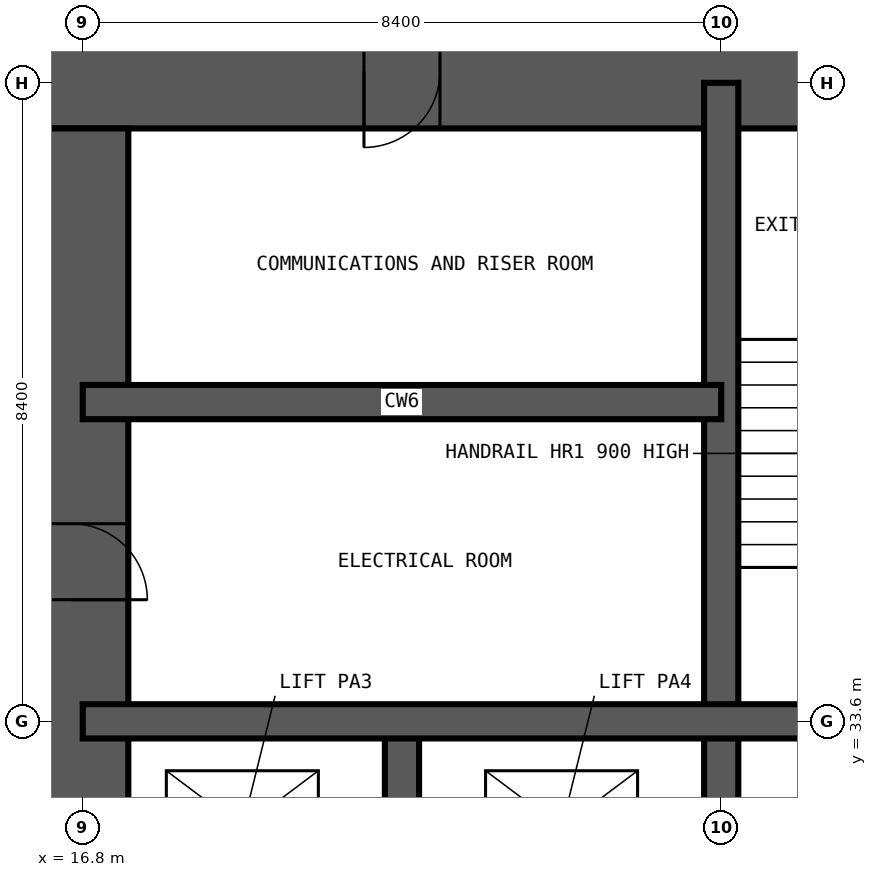
"""IFC4 building model, lengths in metres.
Left out: names, types, materials, properties, quantities, classifications, styles, units other than length and angle.
Written with IfcOpenShell. Run it as: python <this file> out.ifc"""

import sys

from ifc_helpers import new_model, si_unit, direction, frame, frame_2d, origin, place, context, subcontext, project, spatial, rectangle, extrude, element, fill, save


model = new_model("IFC4")
c1 = context("Model", 3, precision=1e-05, world=origin(), true_north=direction((0.0, 1.0)))
c2 = subcontext(c1, "Body", "Model", "MODEL_VIEW")
j1 = project(units=[si_unit("LENGTHUNIT", "METRE"), si_unit("PLANEANGLEUNIT", "RADIAN")], contexts=[c1])
p1 = place(None, origin())
s1 = spatial("IfcSite", under=j1, at=p1, CompositionType="ELEMENT")
p2 = place(p1, origin())
s2 = spatial("IfcBuilding", under=s1, at=p2, CompositionType="ELEMENT")
p3 = place(p2, frame((0.0, 0.0, 81.0)))
s3 = spatial("IfcBuildingStorey", under=s2, at=p3, CompositionType="ELEMENT", Elevation=81.0)
p4 = place(p3, frame((42.9, 42.15, -0.35), z_axis=(0.0, 0.0, 1.0), x_axis=(-1.0, 0.0, 0.0)))
e1 = element("IfcWall", 1, at=p4, inside=s3, PredefinedType="SHEAR", context=c2, shape_type="SweptSolid", body=[
    extrude(rectangle(XDim=27.0, YDim=1.5, at=frame_2d((13.5, 0.0))), origin(), (0.0, 0.0, 1.0), 3.6),
])
p5 = place(p4, frame((21.4, 0.0, 0.35)))
e2 = element("IfcOpeningElement", 2, at=p5, cuts=e1, PredefinedType="OPENING", context=c2, shape_type="SweptSolid", body=[
    extrude(rectangle(XDim=1.0, YDim=2.1, at=frame_2d((0.5, 1.05))), frame((0.0, 0.76, 0.0), z_axis=(0.0, -1.0, 0.0), x_axis=(1.0, 0.0, 0.0)), (0.0, 0.0, 1.0), 1.52),
])
p6 = place(p4, frame((10.8, 0.0, 0.35)))
e3 = element("IfcOpeningElement", 3, at=p6, cuts=e1, PredefinedType="OPENING", context=c2, shape_type="SweptSolid", body=[
    extrude(rectangle(XDim=1.2, YDim=2.2, at=frame_2d((0.6, 1.1))), frame((0.0, 0.76, 0.0), z_axis=(0.0, -1.0, 0.0), x_axis=(1.0, 0.0, 0.0)), (0.0, 0.0, 1.0), 1.52),
])
p7 = place(p3, frame((16.65, 41.4, -0.35), z_axis=(0.0, 0.0, 1.0), x_axis=(0.0, -1.0, 0.0)))
e4 = element("IfcWall", 4, at=p7, inside=s3, PredefinedType="SHEAR", context=c2, shape_type="SweptSolid", body=[
    extrude(rectangle(XDim=24.0, YDim=1.5, at=frame_2d((12.0, 0.0))), origin(), (0.0, 0.0, 1.0), 3.6),
])
p8 = place(p7, frame((11.1, 0.0, 0.35)))
e5 = element("IfcOpeningElement", 5, at=p8, cuts=e4, PredefinedType="OPENING", context=c2, shape_type="SweptSolid", body=[
    extrude(rectangle(XDim=1.8, YDim=2.2, at=frame_2d((0.9, 1.1))), frame((0.0, 0.76, 0.0), z_axis=(0.0, -1.0, 0.0), x_axis=(1.0, 0.0, 0.0)), (0.0, 0.0, 1.0), 1.52),
])
p9 = place(p7, frame((19.9, 0.0, 0.35)))
e6 = element("IfcOpeningElement", 6, at=p9, cuts=e4, PredefinedType="OPENING", context=c2, shape_type="SweptSolid", body=[
    extrude(rectangle(XDim=1.0, YDim=2.1, at=frame_2d((0.5, 1.05))), frame((0.0, 0.76, 0.0), z_axis=(0.0, -1.0, 0.0), x_axis=(1.0, 0.0, 0.0)), (0.0, 0.0, 1.0), 1.52),
])
p10 = place(p7, frame((5.2, 0.0, 0.35)))
e7 = element("IfcOpeningElement", 7, at=p10, cuts=e4, PredefinedType="OPENING", context=c2, shape_type="SweptSolid", body=[
    extrude(rectangle(XDim=1.0, YDim=2.1, at=frame_2d((0.5, 1.05))), frame((0.0, 0.76, 0.0), z_axis=(0.0, -1.0, 0.0), x_axis=(1.0, 0.0, 0.0)), (0.0, 0.0, 1.0), 1.52),
])
p11 = place(p3, frame((21.0, 30.8, -0.35), z_axis=(0.0, 0.0, 1.0), x_axis=(0.0, 1.0, 0.0)))
e8 = element("IfcWall", 8, at=p11, inside=s3, PredefinedType="SHEAR", context=c2, shape_type="SweptSolid", body=[
    extrude(rectangle(XDim=2.8, YDim=0.45, at=frame_2d((1.4, 0.0))), origin(), (0.0, 0.0, 1.0), 3.6),
])
for number, where, z_axis, x_axis in (
    (9, (25.2, 16.8, -0.35), (0.0, 0.0, 1.0), (0.0, 1.0, 0.0)),
    (10, (16.8, 33.6, -0.35), (0.0, 0.0, 1.0), (1.0, 0.0, 0.0)),
):
    element("IfcWall", number, at=place(p3, frame(where, z_axis=z_axis, x_axis=x_axis)), inside=s3, PredefinedType="SHEAR", context=c2, shape_type="SweptSolid", body=[
        extrude(rectangle(XDim=25.2, YDim=0.45, at=frame_2d((12.6, 0.0))), origin(), (0.0, 0.0, 1.0), 3.6),
    ])
p12 = place(p3, frame((16.8, 37.8, -0.35), z_axis=(0.0, 0.0, 1.0), x_axis=(1.0, 0.0, 0.0)))
e11 = element("IfcWall", 11, at=p12, inside=s3, PredefinedType="SHEAR", context=c2, shape_type="SweptSolid", body=[
    extrude(rectangle(XDim=8.4, YDim=0.45, at=frame_2d((4.2, 0.0))), origin(), (0.0, 0.0, 1.0), 3.6),
])
p13 = place(p10, origin())
e12 = element("IfcDoor", 12, at=p13, inside=s3, OperationType="SINGLE_SWING_RIGHT", PredefinedType="DOOR", context=c2, shape_type="SweptSolid", body=[
    extrude(rectangle(XDim=1.0, YDim=2.1, at=frame_2d((0.5, 1.05))), frame((0.0, 0.025, 0.0), z_axis=(0.0, -1.0, 0.0), x_axis=(1.0, 0.0, 0.0)), (0.0, 0.0, 1.0), 0.05),
])
fill(e7, e12)
p14 = place(p5, origin())
e13 = element("IfcDoor", 13, at=p14, inside=s3, OperationType="SINGLE_SWING_RIGHT", PredefinedType="DOOR", context=c2, shape_type="SweptSolid", body=[
    extrude(rectangle(XDim=1.0, YDim=2.1, at=frame_2d((0.5, 1.05))), frame((0.0, 0.025, 0.0), z_axis=(0.0, -1.0, 0.0), x_axis=(1.0, 0.0, 0.0)), (0.0, 0.0, 1.0), 0.05),
])
fill(e2, e13)
save(model, sys.argv[1])
